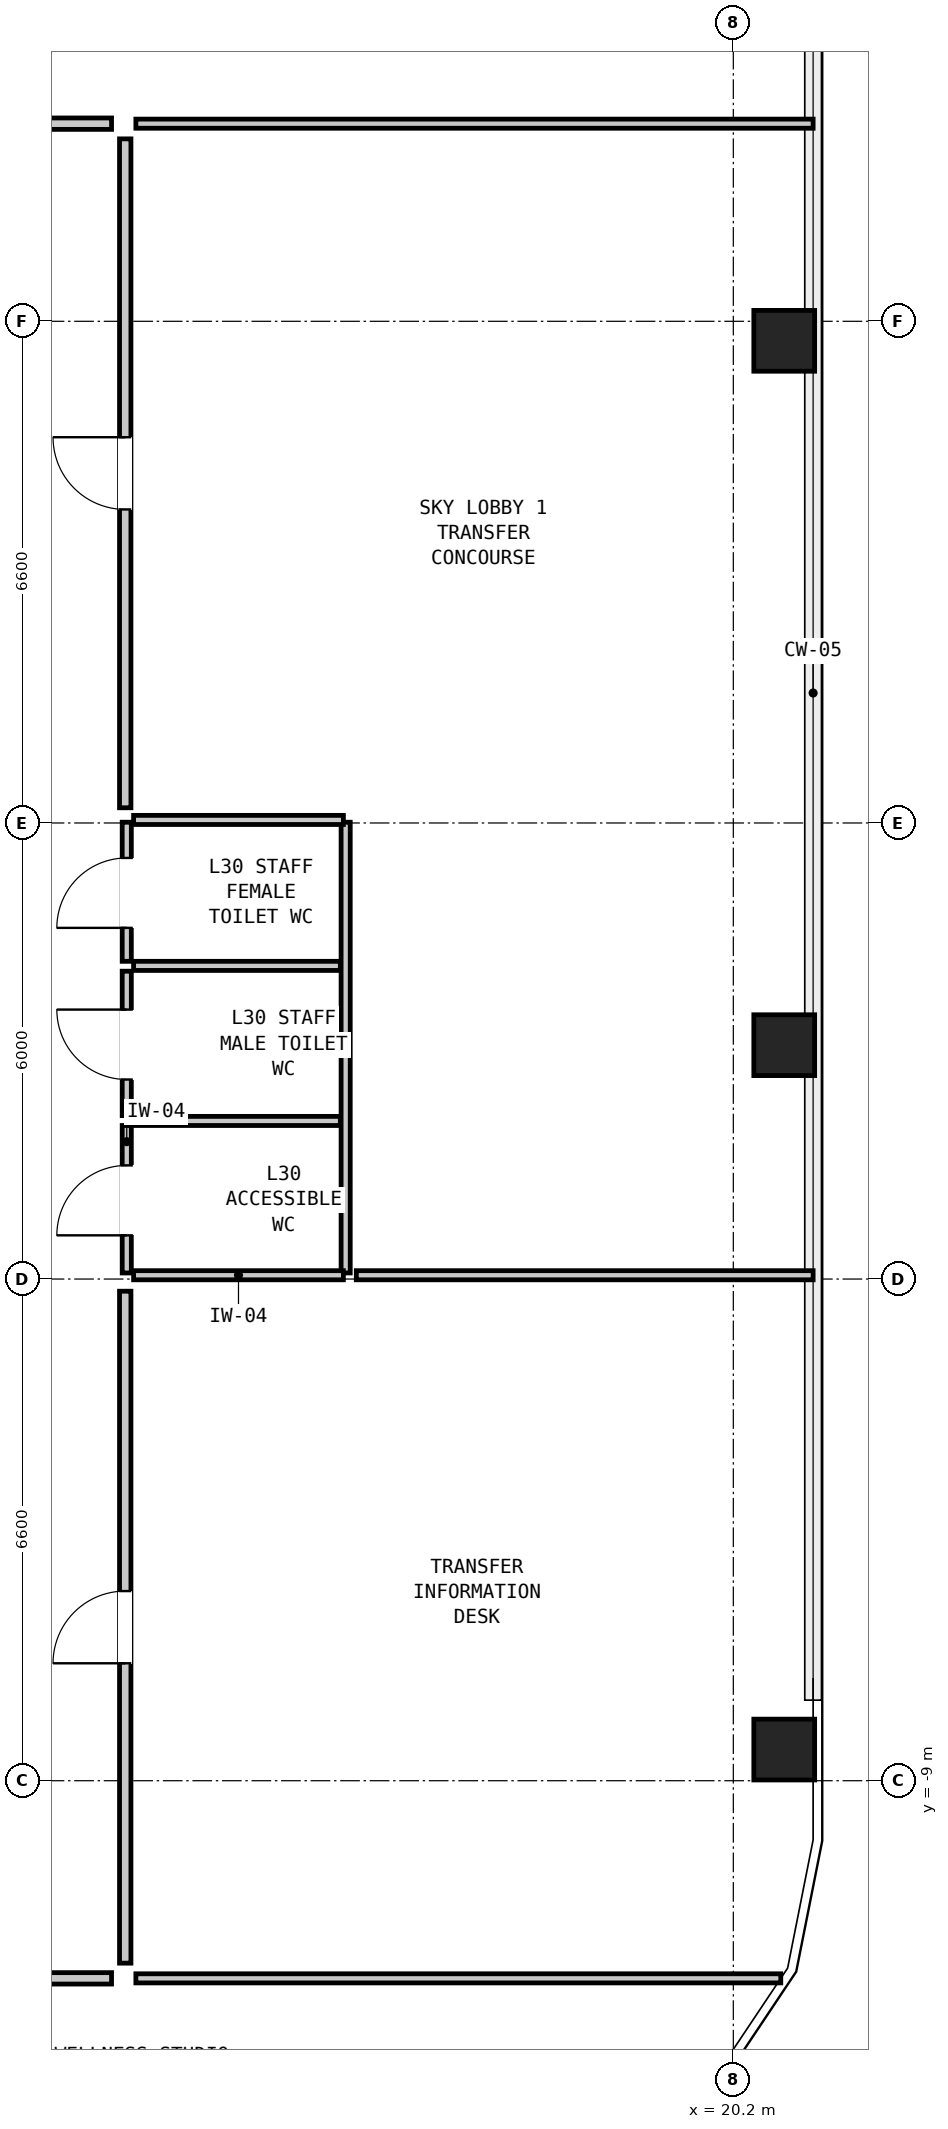
"""IFC4 building model, lengths in metres.
Left out: names, types, materials, properties, quantities, classifications, styles, units other than length and angle.
Written with IfcOpenShell. Run it as: python <this file> out.ifc"""

import sys

from ifc_helpers import new_model, si_unit, direction, frame, frame_2d, origin, origin_2d, place, context, subcontext, project, spatial, rectangle, hollow_rectangle, extrude, element, fill, save


model = new_model("IFC4")
c1 = context("Model", 3, precision=1e-05, world=origin(), true_north=direction((0.0, 1.0)))
c2 = subcontext(c1, "Body", "Model", "MODEL_VIEW")
j1 = project(units=[si_unit("LENGTHUNIT", "METRE"), si_unit("PLANEANGLEUNIT", "RADIAN")], contexts=[c1])
p1 = place(None, origin())
s1 = spatial("IfcSite", under=j1, at=p1, CompositionType="ELEMENT")
p2 = place(p1, origin())
s2 = spatial("IfcBuilding", under=s1, at=p2, CompositionType="ELEMENT")
p3 = place(p2, frame((0.0, 0.0, 104.85)))
s3 = spatial("IfcBuildingStorey", under=s2, at=p3, CompositionType="ELEMENT", Elevation=104.85)
for number, where, z_axis, x_axis in (
    (1, (20.87, -8.59, 0.0), (0.0, 0.0, 1.0), (0.0, 1.0, 0.0)),
    (2, (20.87, 0.677, 0.0), (0.0, 0.0, 1.0), (0.0, 1.0, 0.0)),
    (3, (20.87, 9.943, 0.0), (0.0, 0.0, 1.0), (0.0, 1.0, 0.0)),
):
    element("IfcColumn", number, at=place(p3, frame(where, z_axis=z_axis, x_axis=x_axis)), inside=s3, PredefinedType="COLUMN", context=c2, shape_type="SweptSolid", body=[
        extrude(hollow_rectangle(XDim=0.8, YDim=0.8, WallThickness=0.05, at=origin_2d()), origin(), (0.0, 0.0, 1.0), 3.6),
    ])
p4 = place(p3, frame((12.22, -2.32, 0.0), z_axis=(0.0, 0.0, 1.0), x_axis=(0.0, 1.0, 0.0)))
e4 = element("IfcWall", 4, at=p4, inside=s3, PredefinedType="PARTITIONING", context=c2, shape_type="SweptSolid", body=[
    extrude(rectangle(XDim=1.94, YDim=0.12, at=frame_2d((0.97, 0.0))), origin(), (0.0, 0.0, 1.0), 3.22),
])
p5 = place(p4, frame((0.495, 0.0, 0.0)))
e5 = element("IfcOpeningElement", 5, at=p5, cuts=e4, PredefinedType="OPENING", context=c2, shape_type="SweptSolid", body=[
    extrude(rectangle(XDim=0.92, YDim=2.1, at=frame_2d((0.46, 1.05))), frame((0.0, 0.072, 0.0), z_axis=(0.0, -1.0, 0.0), x_axis=(1.0, 0.0, 0.0)), (0.0, 0.0, 1.0), 0.144),
])
p6 = place(p3, frame((12.22, -0.25, 0.0), z_axis=(0.0, 0.0, 1.0), x_axis=(0.0, 1.0, 0.0)))
e6 = element("IfcWall", 6, at=p6, inside=s3, PredefinedType="PARTITIONING", context=c2, shape_type="SweptSolid", body=[
    extrude(rectangle(XDim=1.9, YDim=0.12, at=frame_2d((0.95, 0.0))), origin(), (0.0, 0.0, 1.0), 3.22),
])
p7 = place(p6, frame((0.475, 0.0, 0.0)))
e7 = element("IfcOpeningElement", 7, at=p7, cuts=e6, PredefinedType="OPENING", context=c2, shape_type="SweptSolid", body=[
    extrude(rectangle(XDim=0.92, YDim=2.1, at=frame_2d((0.46, 1.05))), frame((0.0, 0.072, 0.0), z_axis=(0.0, -1.0, 0.0), x_axis=(1.0, 0.0, 0.0)), (0.0, 0.0, 1.0), 0.144),
])
p8 = place(p3, frame((12.22, 1.78, 0.0), z_axis=(0.0, 0.0, 1.0), x_axis=(0.0, 1.0, 0.0)))
e8 = element("IfcWall", 8, at=p8, inside=s3, PredefinedType="PARTITIONING", context=c2, shape_type="SweptSolid", body=[
    extrude(rectangle(XDim=1.83, YDim=0.12, at=frame_2d((0.915, 0.0))), origin(), (0.0, 0.0, 1.0), 3.22),
])
p9 = place(p8, frame((0.44, 0.0, 0.0)))
e9 = element("IfcOpeningElement", 9, at=p9, cuts=e8, PredefinedType="OPENING", context=c2, shape_type="SweptSolid", body=[
    extrude(rectangle(XDim=0.92, YDim=2.1, at=frame_2d((0.46, 1.05))), frame((0.0, 0.072, 0.0), z_axis=(0.0, -1.0, 0.0), x_axis=(1.0, 0.0, 0.0)), (0.0, 0.0, 1.0), 0.144),
])
p10 = place(p3, frame((15.1, -2.32, 0.0), z_axis=(0.0, 0.0, 1.0), x_axis=(0.0, 1.0, 0.0)))
e10 = element("IfcWall", 10, at=p10, inside=s3, PredefinedType="PARTITIONING", context=c2, shape_type="SweptSolid", body=[
    extrude(rectangle(XDim=5.93, YDim=0.12, at=frame_2d((2.965, 0.0))), origin(), (0.0, 0.0, 1.0), 3.22),
])
for number, where, z_axis, x_axis in (
    (11, (12.31, -2.35, 0.0), (0.0, 0.0, 1.0), (1.0, 0.0, 0.0)),
    (12, (12.31, 3.64, 0.0), (0.0, 0.0, 1.0), (1.0, 0.0, 0.0)),
):
    element("IfcWall", number, at=place(p3, frame(where, z_axis=z_axis, x_axis=x_axis)), inside=s3, PredefinedType="PARTITIONING", context=c2, shape_type="SweptSolid", body=[
        extrude(rectangle(XDim=2.76, YDim=0.12, at=frame_2d((1.38, 0.0))), origin(), (0.0, 0.0, 1.0), 2.42),
    ])
for number, where, z_axis, x_axis in (
    (13, (12.31, -0.32, 0.0), (0.0, 0.0, 1.0), (1.0, 0.0, 0.0)),
    (14, (12.31, 1.72, 0.0), (0.0, 0.0, 1.0), (1.0, 0.0, 0.0)),
):
    element("IfcWall", number, at=place(p3, frame(where, z_axis=z_axis, x_axis=x_axis)), inside=s3, PredefinedType="PARTITIONING", context=c2, shape_type="SweptSolid", body=[
        extrude(rectangle(XDim=2.72, YDim=0.12, at=frame_2d((1.36, 0.0))), origin(), (0.0, 0.0, 1.0), 3.22),
    ])
p11 = place(p3, frame((12.34, 12.8, 0.0), z_axis=(0.0, 0.0, 1.0), x_axis=(1.0, 0.0, 0.0)))
e15 = element("IfcWall", 15, at=p11, inside=s3, PredefinedType="PARTITIONING", context=c2, shape_type="SweptSolid", body=[
    extrude(rectangle(XDim=8.91, YDim=0.12, at=frame_2d((4.455, 0.0))), origin(), (0.0, 0.0, 1.0), 3.22),
])
p12 = place(p3, frame((12.34, -11.6, 0.0), z_axis=(0.0, 0.0, 1.0), x_axis=(1.0, 0.0, 0.0)))
e16 = element("IfcWall", 16, at=p12, inside=s3, PredefinedType="PARTITIONING", context=c2, shape_type="SweptSolid", body=[
    extrude(rectangle(XDim=8.484, YDim=0.12, at=frame_2d((4.242, 0.0))), origin(), (0.0, 0.0, 1.0), 2.438),
])
p13 = place(p3, frame((15.24, -2.35, 0.0), z_axis=(0.0, 0.0, 1.0), x_axis=(1.0, 0.0, 0.0)))
e17 = element("IfcWall", 17, at=p13, inside=s3, PredefinedType="PARTITIONING", context=c2, shape_type="SweptSolid", body=[
    extrude(rectangle(XDim=6.01, YDim=0.12, at=frame_2d((3.005, 0.0))), origin(), (0.0, 0.0, 1.0), 2.42),
])
p14 = place(p3, frame((5.78, 12.8, 0.0), z_axis=(0.0, 0.0, 1.0), x_axis=(1.0, 0.0, 0.0)))
e18 = element("IfcWall", 18, at=p14, inside=s3, PredefinedType="PARTITIONING", context=c2, shape_type="SweptSolid", body=[
    extrude(rectangle(XDim=6.24, YDim=0.15, at=frame_2d((3.12, 0.0))), origin(), (0.0, 0.0, 1.0), 3.22),
])
p15 = place(p14, frame((2.645, 0.0, 0.0)))
e19 = element("IfcOpeningElement", 19, at=p15, cuts=e18, PredefinedType="OPENING", context=c2, shape_type="SweptSolid", body=[
    extrude(rectangle(XDim=0.95, YDim=2.1, at=frame_2d((0.475, 1.05))), frame((0.0, 0.087, 0.0), z_axis=(0.0, -1.0, 0.0), x_axis=(1.0, 0.0, 0.0)), (0.0, 0.0, 1.0), 0.174),
])
p16 = place(p3, frame((4.68, -11.6, 0.0), z_axis=(0.0, 0.0, 1.0), x_axis=(1.0, 0.0, 0.0)))
e20 = element("IfcWall", 20, at=p16, inside=s3, PredefinedType="PARTITIONING", context=c2, shape_type="SweptSolid", body=[
    extrude(rectangle(XDim=7.34, YDim=0.15, at=frame_2d((3.67, 0.0))), origin(), (0.0, 0.0, 1.0), 2.438),
])
p17 = place(p16, frame((3.195, 0.0, 0.0)))
e21 = element("IfcOpeningElement", 21, at=p17, cuts=e20, PredefinedType="OPENING", context=c2, shape_type="SweptSolid", body=[
    extrude(rectangle(XDim=0.95, YDim=2.1, at=frame_2d((0.475, 1.05))), frame((0.0, 0.087, 0.0), z_axis=(0.0, -1.0, 0.0), x_axis=(1.0, 0.0, 0.0)), (0.0, 0.0, 1.0), 0.174),
])
p18 = place(p3, frame((12.2, -11.4, 0.0), z_axis=(0.0, 0.0, 1.0), x_axis=(0.0, 1.0, 0.0)))
e22 = element("IfcWall", 22, at=p18, inside=s3, PredefinedType="PARTITIONING", context=c2, shape_type="SweptSolid", body=[
    extrude(rectangle(XDim=8.84, YDim=0.15, at=frame_2d((4.42, 0.0))), origin(), (0.0, 0.0, 1.0), 3.22),
])
p19 = place(p18, frame((3.945, 0.0, 0.0)))
e23 = element("IfcOpeningElement", 23, at=p19, cuts=e22, PredefinedType="OPENING", context=c2, shape_type="SweptSolid", body=[
    extrude(rectangle(XDim=0.95, YDim=2.1, at=frame_2d((0.475, 1.05))), frame((0.0, 0.087, 0.0), z_axis=(0.0, -1.0, 0.0), x_axis=(1.0, 0.0, 0.0)), (0.0, 0.0, 1.0), 0.174),
])
p20 = place(p3, frame((12.2, 3.8, 0.0), z_axis=(0.0, 0.0, 1.0), x_axis=(0.0, 1.0, 0.0)))
e24 = element("IfcWall", 24, at=p20, inside=s3, PredefinedType="PARTITIONING", context=c2, shape_type="SweptSolid", body=[
    extrude(rectangle(XDim=8.8, YDim=0.15, at=frame_2d((4.4, 0.0))), origin(), (0.0, 0.0, 1.0), 3.22),
])
p21 = place(p20, frame((3.925, 0.0, 0.0)))
e25 = element("IfcOpeningElement", 25, at=p21, cuts=e24, PredefinedType="OPENING", context=c2, shape_type="SweptSolid", body=[
    extrude(rectangle(XDim=0.95, YDim=2.1, at=frame_2d((0.475, 1.05))), frame((0.0, 0.087, 0.0), z_axis=(0.0, -1.0, 0.0), x_axis=(1.0, 0.0, 0.0)), (0.0, 0.0, 1.0), 0.174),
])
p22 = place(p5, origin())
e26 = element("IfcDoor", 26, at=p22, inside=s3, OperationType="SINGLE_SWING_LEFT", PredefinedType="DOOR", context=c2, shape_type="SweptSolid", body=[
    extrude(rectangle(XDim=0.92, YDim=2.1, at=frame_2d((0.46, 1.05))), frame((0.0, 0.025, 0.0), z_axis=(0.0, -1.0, 0.0), x_axis=(1.0, 0.0, 0.0)), (0.0, 0.0, 1.0), 0.05),
])
fill(e5, e26)
p23 = place(p7, origin())
e27 = element("IfcDoor", 27, at=p23, inside=s3, OperationType="SINGLE_SWING_RIGHT", PredefinedType="DOOR", context=c2, shape_type="SweptSolid", body=[
    extrude(rectangle(XDim=0.92, YDim=2.1, at=frame_2d((0.46, 1.05))), frame((0.0, 0.025, 0.0), z_axis=(0.0, -1.0, 0.0), x_axis=(1.0, 0.0, 0.0)), (0.0, 0.0, 1.0), 0.05),
])
fill(e7, e27)
p24 = place(p9, origin())
e28 = element("IfcDoor", 28, at=p24, inside=s3, OperationType="SINGLE_SWING_LEFT", PredefinedType="DOOR", context=c2, shape_type="SweptSolid", body=[
    extrude(rectangle(XDim=0.92, YDim=2.1, at=frame_2d((0.46, 1.05))), frame((0.0, 0.025, 0.0), z_axis=(0.0, -1.0, 0.0), x_axis=(1.0, 0.0, 0.0)), (0.0, 0.0, 1.0), 0.05),
])
fill(e9, e28)
p25 = place(p19, origin())
e29 = element("IfcDoor", 29, at=p25, inside=s3, OperationType="SINGLE_SWING_LEFT", PredefinedType="DOOR", context=c2, shape_type="SweptSolid", body=[
    extrude(rectangle(XDim=0.95, YDim=2.1, at=frame_2d((0.475, 1.05))), frame((0.0, 0.025, 0.0), z_axis=(0.0, -1.0, 0.0), x_axis=(1.0, 0.0, 0.0)), (0.0, 0.0, 1.0), 0.05),
])
fill(e23, e29)
p26 = place(p21, origin())
e30 = element("IfcDoor", 30, at=p26, inside=s3, OperationType="SINGLE_SWING_RIGHT", PredefinedType="DOOR", context=c2, shape_type="SweptSolid", body=[
    extrude(rectangle(XDim=0.95, YDim=2.1, at=frame_2d((0.475, 1.05))), frame((0.0, 0.025, 0.0), z_axis=(0.0, -1.0, 0.0), x_axis=(1.0, 0.0, 0.0)), (0.0, 0.0, 1.0), 0.05),
])
fill(e25, e30)
save(model, sys.argv[1])
